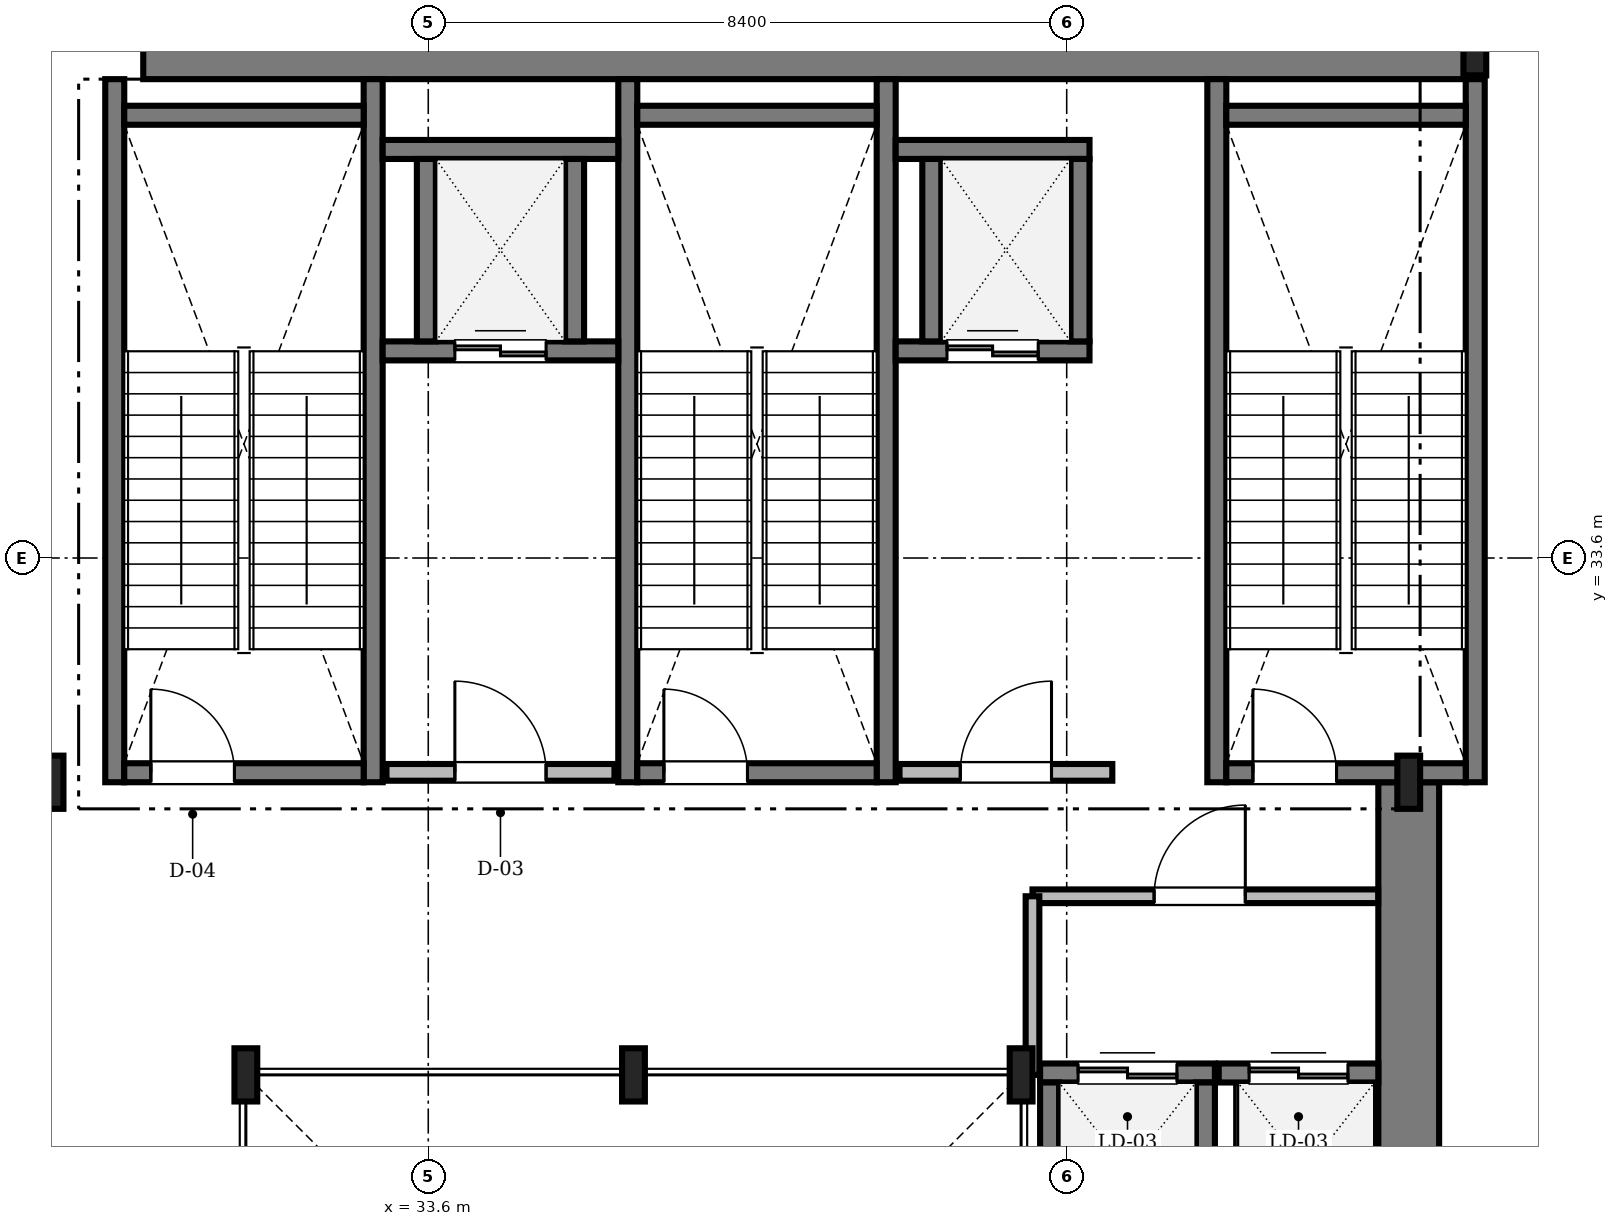
"""IFC4 building model, lengths in metres.
Left out: names, types, materials, properties, quantities, classifications, styles, units other than length and angle.
Written with IfcOpenShell. Run it as: python <this file> out.ifc"""

import sys

from ifc_helpers import new_model, si_unit, direction, frame, frame_2d, origin, origin_2d, place, context, subcontext, project, spatial, rectangle, i_section, extrude, source, transform, mapped, element, fill, save


model = new_model("IFC4")
c1 = context("Model", 3, precision=1e-05, world=origin(), true_north=direction((0.0, 1.0)))
c2 = subcontext(c1, "Body", "Model", "MODEL_VIEW")
j1 = project(units=[si_unit("LENGTHUNIT", "METRE"), si_unit("PLANEANGLEUNIT", "RADIAN")], contexts=[c1])
p1 = place(None, origin())
s1 = spatial("IfcSite", under=j1, at=p1, CompositionType="ELEMENT")
p2 = place(p1, origin())
s2 = spatial("IfcBuilding", under=s1, at=p2, CompositionType="ELEMENT")
p3 = place(p2, frame((0.0, 0.0, 237.3)))
s3 = spatial("IfcBuildingStorey", under=s2, at=p3, CompositionType="ELEMENT", Elevation=237.3)
m1 = source(origin(), c2, "Body", "SweptSolid", [
    extrude(rectangle(XDim=17.52, YDim=0.8, at=frame_2d((8.76, 0.0))), origin(), (0.0, 0.0, 1.0), 4.75),
])
p4 = place(p3, frame((29.85, 40.3, 0.0), z_axis=(0.0, 0.0, 1.0), x_axis=(1.0, 0.0, 0.0)))
e1 = element("IfcWall", 1, at=p4, inside=s3, PredefinedType="SHEAR", context=c2, shape_type="MappedRepresentation", body=[
    mapped(m1, transform((0.0, 0.0, 0.0), scale=1.0)),
])
m2 = source(origin(), c2, "Body", "SweptSolid", [
    extrude(rectangle(XDim=13.15, YDim=0.8, at=frame_2d((6.575, 0.0))), origin(), (0.0, 0.0, 1.0), 4.75),
])
p5 = place(p3, frame((46.5, 17.5, 0.0), z_axis=(0.0, 0.0, 1.0), x_axis=(0.0, 1.0, 0.0)))
e2 = element("IfcWall", 2, at=p5, inside=s3, PredefinedType="SHEAR", context=c2, shape_type="MappedRepresentation", body=[
    mapped(m2, transform((0.0, 0.0, 0.0), scale=1.0)),
])
m3 = source(origin(), c2, "Body", "SweptSolid", [
    extrude(i_section(OverallWidth=0.3, OverallDepth=0.7, WebThickness=0.017, FlangeThickness=0.032, FilletRadius=0.027, at=origin_2d()), origin(), (0.0, 0.0, 1.0), 4.75),
])
for number, where, z_axis, x_axis in (
    (3, (41.4, 26.8, 0.0), (0.0, 0.0, 1.0), (1.0, 0.0, 0.0)),
    (4, (36.3, 26.8, 0.0), (0.0, 0.0, 1.0), (1.0, 0.0, 0.0)),
    (5, (31.2, 26.8, 0.0), (0.0, 0.0, 1.0), (1.0, 0.0, 0.0)),
    (6, (28.65, 30.65, 0.0), (0.0, 0.0, 1.0), (1.0, 0.0, 0.0)),
    (7, (46.5, 30.65, 0.0), (0.0, 0.0, 1.0), (1.0, 0.0, 0.0)),
    (8, (47.37, 40.3, 0.0), (0.0, 0.0, 1.0), (1.0, 0.0, 0.0)),
):
    element("IfcColumn", number, at=place(p3, frame(where, z_axis=z_axis, x_axis=x_axis)), inside=s3, PredefinedType="COLUMN", context=c2, shape_type="MappedRepresentation", body=[
        mapped(m3, transform((0.0, 0.0, 0.0), scale=1.0)),
    ])
m4 = source(origin(), c2, "Body", "SweptSolid", [
    extrude(rectangle(XDim=9.25, YDim=0.25, at=frame_2d((4.625, 0.0))), origin(), (0.0, 0.0, 1.0), 5.2),
])
for number, where, z_axis, x_axis in (
    (9, (29.475, 30.65, 0.0), (0.0, 0.0, 1.0), (0.0, 1.0, 0.0)),
    (10, (32.875, 30.65, 0.0), (0.0, 0.0, 1.0), (0.0, 1.0, 0.0)),
):
    element("IfcWall", number, at=place(p3, frame(where, z_axis=z_axis, x_axis=x_axis)), inside=s3, PredefinedType="SOLIDWALL", context=c2, shape_type="MappedRepresentation", body=[
        mapped(m4, transform((0.0, 0.0, 0.0), scale=1.0)),
    ])
m5 = source(origin(), c2, "Body", "SweptSolid", [
    extrude(rectangle(XDim=3.15, YDim=0.25, at=frame_2d((1.575, 0.0))), origin(), (0.0, 0.0, 1.0), 5.2),
])
p6 = place(p3, frame((29.6, 39.425, 0.0), z_axis=(0.0, 0.0, 1.0), x_axis=(1.0, 0.0, 0.0)))
e11 = element("IfcWall", 11, at=p6, inside=s3, PredefinedType="SOLIDWALL", context=c2, shape_type="MappedRepresentation", body=[
    mapped(m5, transform((0.0, 0.0, 0.0), scale=1.0)),
])
p7 = place(p3, frame((29.6, 30.775, 0.0), z_axis=(0.0, 0.0, 1.0), x_axis=(1.0, 0.0, 0.0)))
e12 = element("IfcWall", 12, at=p7, inside=s3, PredefinedType="SOLIDWALL", context=c2, shape_type="MappedRepresentation", body=[
    mapped(m5, transform((0.0, 0.0, 0.0), scale=1.0)),
])
m6 = source(origin(), c2, "Body", "SweptSolid", [
    extrude(rectangle(XDim=1.1, YDim=2.2, at=frame_2d((0.55, 1.1))), frame((0.0, 0.135, 0.0), z_axis=(0.0, -1.0, 0.0), x_axis=(1.0, 0.0, 0.0)), (0.0, 0.0, 1.0), 0.27),
])
p8 = place(p7, frame((0.35, 0.0, 0.0)))
e13 = element("IfcOpeningElement", 13, at=p8, cuts=e12, PredefinedType="OPENING", context=c2, shape_type="MappedRepresentation", body=[
    mapped(m6, transform((0.0, 0.0, 0.0), scale=1.0)),
])
for number, where, z_axis, x_axis in (
    (14, (36.225, 30.65, 0.0), (0.0, 0.0, 1.0), (0.0, 1.0, 0.0)),
    (15, (39.625, 30.65, 0.0), (0.0, 0.0, 1.0), (0.0, 1.0, 0.0)),
):
    element("IfcWall", number, at=place(p3, frame(where, z_axis=z_axis, x_axis=x_axis)), inside=s3, PredefinedType="SOLIDWALL", context=c2, shape_type="MappedRepresentation", body=[
        mapped(m4, transform((0.0, 0.0, 0.0), scale=1.0)),
    ])
p9 = place(p3, frame((36.35, 39.425, 0.0), z_axis=(0.0, 0.0, 1.0), x_axis=(1.0, 0.0, 0.0)))
e16 = element("IfcWall", 16, at=p9, inside=s3, PredefinedType="SOLIDWALL", context=c2, shape_type="MappedRepresentation", body=[
    mapped(m5, transform((0.0, 0.0, 0.0), scale=1.0)),
])
p10 = place(p3, frame((36.35, 30.775, 0.0), z_axis=(0.0, 0.0, 1.0), x_axis=(1.0, 0.0, 0.0)))
e17 = element("IfcWall", 17, at=p10, inside=s3, PredefinedType="SOLIDWALL", context=c2, shape_type="MappedRepresentation", body=[
    mapped(m5, transform((0.0, 0.0, 0.0), scale=1.0)),
])
p11 = place(p10, frame((0.35, 0.0, 0.0)))
e18 = element("IfcOpeningElement", 18, at=p11, cuts=e17, PredefinedType="OPENING", context=c2, shape_type="MappedRepresentation", body=[
    mapped(m6, transform((0.0, 0.0, 0.0), scale=1.0)),
])
for number, where, z_axis, x_axis in (
    (19, (43.975, 30.65, 0.0), (0.0, 0.0, 1.0), (0.0, 1.0, 0.0)),
    (20, (47.375, 30.65, 0.0), (0.0, 0.0, 1.0), (0.0, 1.0, 0.0)),
):
    element("IfcWall", number, at=place(p3, frame(where, z_axis=z_axis, x_axis=x_axis)), inside=s3, PredefinedType="SOLIDWALL", context=c2, shape_type="MappedRepresentation", body=[
        mapped(m4, transform((0.0, 0.0, 0.0), scale=1.0)),
    ])
p12 = place(p3, frame((44.1, 39.425, 0.0), z_axis=(0.0, 0.0, 1.0), x_axis=(1.0, 0.0, 0.0)))
e21 = element("IfcWall", 21, at=p12, inside=s3, PredefinedType="SOLIDWALL", context=c2, shape_type="MappedRepresentation", body=[
    mapped(m5, transform((0.0, 0.0, 0.0), scale=1.0)),
])
p13 = place(p3, frame((44.1, 30.775, 0.0), z_axis=(0.0, 0.0, 1.0), x_axis=(1.0, 0.0, 0.0)))
e22 = element("IfcWall", 22, at=p13, inside=s3, PredefinedType="SOLIDWALL", context=c2, shape_type="MappedRepresentation", body=[
    mapped(m5, transform((0.0, 0.0, 0.0), scale=1.0)),
])
p14 = place(p13, frame((0.35, 0.0, 0.0)))
e23 = element("IfcOpeningElement", 23, at=p14, cuts=e22, PredefinedType="OPENING", context=c2, shape_type="MappedRepresentation", body=[
    mapped(m6, transform((0.0, 0.0, 0.0), scale=1.0)),
])
m7 = source(origin(), c2, "Body", "SweptSolid", [
    extrude(rectangle(XDim=3.0, YDim=0.22, at=frame_2d((1.5, 0.0))), origin(), (0.0, 0.0, 1.0), 4.75),
])
p15 = place(p3, frame((33.05, 30.78, 0.0), z_axis=(0.0, 0.0, 1.0), x_axis=(1.0, 0.0, 0.0)))
e24 = element("IfcWall", 24, at=p15, inside=s3, PredefinedType="SOLIDWALL", context=c2, shape_type="MappedRepresentation", body=[
    mapped(m7, transform((0.0, 0.0, 0.0), scale=1.0)),
])
m8 = source(origin(), c2, "Body", "SweptSolid", [
    extrude(rectangle(XDim=1.2, YDim=2.2, at=frame_2d((0.6, 1.1))), frame((0.0, 0.12, 0.0), z_axis=(0.0, -1.0, 0.0), x_axis=(1.0, 0.0, 0.0)), (0.0, 0.0, 1.0), 0.24),
])
p16 = place(p15, frame((0.9, 0.0, 0.0)))
e25 = element("IfcOpeningElement", 25, at=p16, cuts=e24, PredefinedType="OPENING", context=c2, shape_type="MappedRepresentation", body=[
    mapped(m8, transform((0.0, 0.0, 0.0), scale=1.0)),
])
m9 = source(origin(), c2, "Body", "SweptSolid", [
    extrude(rectangle(XDim=2.8, YDim=0.22, at=frame_2d((1.4, 0.0))), origin(), (0.0, 0.0, 1.0), 4.75),
])
p17 = place(p3, frame((39.8, 30.78, 0.0), z_axis=(0.0, 0.0, 1.0), x_axis=(1.0, 0.0, 0.0)))
e26 = element("IfcWall", 26, at=p17, inside=s3, PredefinedType="SOLIDWALL", context=c2, shape_type="MappedRepresentation", body=[
    mapped(m9, transform((0.0, 0.0, 0.0), scale=1.0)),
])
p18 = place(p17, frame((0.8, 0.0, 0.0)))
e27 = element("IfcOpeningElement", 27, at=p18, cuts=e26, PredefinedType="OPENING", context=c2, shape_type="MappedRepresentation", body=[
    mapped(m8, transform((0.0, 0.0, 0.0), scale=1.0)),
])
m10 = source(origin(), c2, "Body", "SweptSolid", [
    extrude(rectangle(XDim=3.1, YDim=0.25, at=frame_2d((1.55, 0.0))), origin(), (0.0, 0.0, 1.0), 4.75),
])
p19 = place(p3, frame((33.0, 36.325, 0.0), z_axis=(0.0, 0.0, 1.0), x_axis=(1.0, 0.0, 0.0)))
e28 = element("IfcWall", 28, at=p19, inside=s3, PredefinedType="SOLIDWALL", context=c2, shape_type="MappedRepresentation", body=[
    mapped(m10, transform((0.0, 0.0, 0.0), scale=1.0)),
])
m11 = source(origin(), c2, "Body", "SweptSolid", [
    extrude(rectangle(XDim=1.2, YDim=2.25, at=frame_2d((0.6, 1.125))), frame((0.0, 0.135, 0.0), z_axis=(0.0, -1.0, 0.0), x_axis=(1.0, 0.0, 0.0)), (0.0, 0.0, 1.0), 0.27),
])
p20 = place(p19, frame((0.95, 0.0, 0.0)))
e29 = element("IfcOpeningElement", 29, at=p20, cuts=e28, PredefinedType="OPENING", context=c2, shape_type="MappedRepresentation", body=[
    mapped(m11, transform((0.0, 0.0, 0.0), scale=1.0)),
])
p21 = place(p3, frame((33.0, 38.975, 0.0), z_axis=(0.0, 0.0, 1.0), x_axis=(1.0, 0.0, 0.0)))
e30 = element("IfcWall", 30, at=p21, inside=s3, PredefinedType="SOLIDWALL", context=c2, shape_type="MappedRepresentation", body=[
    mapped(m10, transform((0.0, 0.0, 0.0), scale=1.0)),
])
m12 = source(origin(), c2, "Body", "SweptSolid", [
    extrude(rectangle(XDim=2.4, YDim=0.25, at=frame_2d((1.2, 0.0))), origin(), (0.0, 0.0, 1.0), 4.75),
])
for number, where, z_axis, x_axis in (
    (31, (33.575, 36.45, 0.0), (0.0, 0.0, 1.0), (0.0, 1.0, 0.0)),
    (32, (35.525, 36.45, 0.0), (0.0, 0.0, 1.0), (0.0, 1.0, 0.0)),
):
    element("IfcWall", number, at=place(p3, frame(where, z_axis=z_axis, x_axis=x_axis)), inside=s3, PredefinedType="SOLIDWALL", context=c2, shape_type="MappedRepresentation", body=[
        mapped(m12, transform((0.0, 0.0, 0.0), scale=1.0)),
    ])
m13 = source(origin(), c2, "Body", "SweptSolid", [
    extrude(rectangle(XDim=2.55, YDim=0.25, at=frame_2d((1.275, 0.0))), origin(), (0.0, 0.0, 1.0), 4.75),
])
p22 = place(p3, frame((39.75, 36.325, 0.0), z_axis=(0.0, 0.0, 1.0), x_axis=(1.0, 0.0, 0.0)))
e33 = element("IfcWall", 33, at=p22, inside=s3, PredefinedType="SOLIDWALL", context=c2, shape_type="MappedRepresentation", body=[
    mapped(m13, transform((0.0, 0.0, 0.0), scale=1.0)),
])
p23 = place(p22, frame((0.675, 0.0, 0.0)))
e34 = element("IfcOpeningElement", 34, at=p23, cuts=e33, PredefinedType="OPENING", context=c2, shape_type="MappedRepresentation", body=[
    mapped(m11, transform((0.0, 0.0, 0.0), scale=1.0)),
])
p24 = place(p3, frame((39.75, 38.975, 0.0), z_axis=(0.0, 0.0, 1.0), x_axis=(1.0, 0.0, 0.0)))
e35 = element("IfcWall", 35, at=p24, inside=s3, PredefinedType="SOLIDWALL", context=c2, shape_type="MappedRepresentation", body=[
    mapped(m13, transform((0.0, 0.0, 0.0), scale=1.0)),
])
for number, where, z_axis, x_axis in (
    (36, (40.225, 36.45, 0.0), (0.0, 0.0, 1.0), (0.0, 1.0, 0.0)),
    (37, (42.175, 36.45, 0.0), (0.0, 0.0, 1.0), (0.0, 1.0, 0.0)),
):
    element("IfcWall", number, at=place(p3, frame(where, z_axis=z_axis, x_axis=x_axis)), inside=s3, PredefinedType="SOLIDWALL", context=c2, shape_type="MappedRepresentation", body=[
        mapped(m12, transform((0.0, 0.0, 0.0), scale=1.0)),
    ])
m14 = source(origin(), c2, "Body", "SweptSolid", [
    extrude(rectangle(XDim=2.3, YDim=0.25, at=frame_2d((1.15, 0.0))), origin(), (0.0, 0.0, 1.0), 4.75),
])
p25 = place(p3, frame((41.65, 26.825, 0.0), z_axis=(0.0, 0.0, 1.0), x_axis=(1.0, 0.0, 0.0)))
e38 = element("IfcWall", 38, at=p25, inside=s3, PredefinedType="SOLIDWALL", context=c2, shape_type="MappedRepresentation", body=[
    mapped(m14, transform((0.0, 0.0, 0.0), scale=1.0)),
])
m15 = source(origin(), c2, "Body", "SweptSolid", [
    extrude(rectangle(XDim=1.3, YDim=2.3, at=frame_2d((0.65, 1.15))), frame((0.0, 0.135, 0.0), z_axis=(0.0, -1.0, 0.0), x_axis=(1.0, 0.0, 0.0)), (0.0, 0.0, 1.0), 0.27),
])
p26 = place(p25, frame((0.5, 0.0, 0.0)))
e39 = element("IfcOpeningElement", 39, at=p26, cuts=e38, PredefinedType="OPENING", context=c2, shape_type="MappedRepresentation", body=[
    mapped(m15, transform((0.0, 0.0, 0.0), scale=1.0)),
])
for number, where, z_axis, x_axis in (
    (40, (41.775, 24.4, 0.0), (0.0, 0.0, 1.0), (0.0, 1.0, 0.0)),
    (41, (43.825, 24.4, 0.0), (0.0, 0.0, 1.0), (0.0, 1.0, 0.0)),
):
    element("IfcWall", number, at=place(p3, frame(where, z_axis=z_axis, x_axis=x_axis)), inside=s3, PredefinedType="SOLIDWALL", context=c2, shape_type="MappedRepresentation", body=[
        mapped(m14, transform((0.0, 0.0, 0.0), scale=1.0)),
    ])
m16 = source(origin(), c2, "Body", "SweptSolid", [
    extrude(rectangle(XDim=2.1, YDim=0.25, at=frame_2d((1.05, 0.0))), origin(), (0.0, 0.0, 1.0), 4.75),
])
p27 = place(p3, frame((44.0, 26.825, 0.0), z_axis=(0.0, 0.0, 1.0), x_axis=(1.0, 0.0, 0.0)))
e42 = element("IfcWall", 42, at=p27, inside=s3, PredefinedType="SOLIDWALL", context=c2, shape_type="MappedRepresentation", body=[
    mapped(m16, transform((0.0, 0.0, 0.0), scale=1.0)),
])
p28 = place(p27, frame((0.4, 0.0, 0.0)))
e43 = element("IfcOpeningElement", 43, at=p28, cuts=e42, PredefinedType="OPENING", context=c2, shape_type="MappedRepresentation", body=[
    mapped(m15, transform((0.0, 0.0, 0.0), scale=1.0)),
])
m17 = source(origin(), c2, "Body", "SweptSolid", [
    extrude(rectangle(XDim=4.548, YDim=0.18, at=frame_2d((2.274, 0.0))), origin(), (0.0, 0.0, 1.0), 4.382),
])
p29 = place(p3, frame((41.55, 29.15, 0.0), z_axis=(0.0, 0.0, 1.0), x_axis=(1.0, 0.0, 0.0)))
e44 = element("IfcWall", 44, at=p29, inside=s3, PredefinedType="PARTITIONING", context=c2, shape_type="MappedRepresentation", body=[
    mapped(m17, transform((0.0, 0.0, 0.0), scale=1.0)),
])
m18 = source(origin(), c2, "Body", "SweptSolid", [
    extrude(rectangle(XDim=1.2, YDim=2.2, at=frame_2d((0.6, 1.1))), frame((0.0, 0.1, 0.0), z_axis=(0.0, -1.0, 0.0), x_axis=(1.0, 0.0, 0.0)), (0.0, 0.0, 1.0), 0.2),
])
p30 = place(p29, frame((1.6, 0.0, 0.0)))
e45 = element("IfcOpeningElement", 45, at=p30, cuts=e44, PredefinedType="OPENING", context=c2, shape_type="MappedRepresentation", body=[
    mapped(m18, transform((0.0, 0.0, 0.0), scale=1.0)),
])
m19 = source(origin(), c2, "Body", "SweptSolid", [
    extrude(rectangle(XDim=2.35, YDim=0.18, at=frame_2d((1.175, 0.0))), origin(), (0.0, 0.0, 1.0), 4.382),
])
p31 = place(p3, frame((41.55, 26.8, 0.0), z_axis=(0.0, 0.0, 1.0), x_axis=(0.0, 1.0, 0.0)))
e46 = element("IfcWall", 46, at=p31, inside=s3, PredefinedType="PARTITIONING", context=c2, shape_type="MappedRepresentation", body=[
    mapped(m19, transform((0.0, 0.0, 0.0), scale=1.0)),
])
m20 = source(origin(), c2, "Body", "SweptSolid", [
    extrude(rectangle(XDim=1.1, YDim=2.2, at=frame_2d((0.55, 1.1))), frame((0.0, 0.025, 0.0), z_axis=(0.0, -1.0, 0.0), x_axis=(1.0, 0.0, 0.0)), (0.0, 0.0, 1.0), 0.05),
])
p32 = place(p8, origin())
e47 = element("IfcDoor", 47, at=p32, inside=s3, OperationType="SINGLE_SWING_LEFT", PredefinedType="DOOR", context=c2, shape_type="MappedRepresentation", body=[
    mapped(m20, transform((0.0, 0.0, 0.0), scale=1.0)),
])
fill(e13, e47)
p33 = place(p11, origin())
e48 = element("IfcDoor", 48, at=p33, inside=s3, OperationType="SINGLE_SWING_LEFT", PredefinedType="DOOR", context=c2, shape_type="MappedRepresentation", body=[
    mapped(m20, transform((0.0, 0.0, 0.0), scale=1.0)),
])
fill(e18, e48)
p34 = place(p14, origin())
e49 = element("IfcDoor", 49, at=p34, inside=s3, OperationType="SINGLE_SWING_LEFT", PredefinedType="DOOR", context=c2, shape_type="MappedRepresentation", body=[
    mapped(m20, transform((0.0, 0.0, 0.0), scale=1.0)),
])
fill(e23, e49)
m21 = source(origin(), c2, "Body", "SweptSolid", [
    extrude(rectangle(XDim=1.2, YDim=2.2, at=frame_2d((0.6, 1.1))), frame((0.0, 0.025, 0.0), z_axis=(0.0, -1.0, 0.0), x_axis=(1.0, 0.0, 0.0)), (0.0, 0.0, 1.0), 0.05),
])
p35 = place(p16, origin())
e50 = element("IfcDoor", 50, at=p35, inside=s3, OperationType="SINGLE_SWING_LEFT", PredefinedType="DOOR", context=c2, shape_type="MappedRepresentation", body=[
    mapped(m21, transform((0.0, 0.0, 0.0), scale=1.0)),
])
fill(e25, e50)
p36 = place(p18, origin())
e51 = element("IfcDoor", 51, at=p36, inside=s3, OperationType="SINGLE_SWING_RIGHT", PredefinedType="DOOR", context=c2, shape_type="MappedRepresentation", body=[
    mapped(m21, transform((0.0, 0.0, 0.0), scale=1.0)),
])
fill(e27, e51)
m22 = source(origin(), c2, "Body", "SweptSolid", [
    extrude(rectangle(XDim=1.2, YDim=2.25, at=frame_2d((0.6, 1.125))), frame((0.0, 0.025, 0.0), z_axis=(0.0, -1.0, 0.0), x_axis=(1.0, 0.0, 0.0)), (0.0, 0.0, 1.0), 0.05),
])
p37 = place(p20, origin())
e52 = element("IfcDoor", 52, at=p37, inside=s3, OperationType="DOUBLE_DOOR_SLIDING", PredefinedType="DOOR", context=c2, shape_type="MappedRepresentation", body=[
    mapped(m22, transform((0.0, 0.0, 0.0), scale=1.0)),
])
fill(e29, e52)
p38 = place(p23, origin())
e53 = element("IfcDoor", 53, at=p38, inside=s3, OperationType="DOUBLE_DOOR_SLIDING", PredefinedType="DOOR", context=c2, shape_type="MappedRepresentation", body=[
    mapped(m22, transform((0.0, 0.0, 0.0), scale=1.0)),
])
fill(e34, e53)
m23 = source(origin(), c2, "Body", "SweptSolid", [
    extrude(rectangle(XDim=1.3, YDim=2.3, at=frame_2d((0.65, 1.15))), frame((0.0, 0.025, 0.0), z_axis=(0.0, -1.0, 0.0), x_axis=(1.0, 0.0, 0.0)), (0.0, 0.0, 1.0), 0.05),
])
p39 = place(p26, origin())
e54 = element("IfcDoor", 54, at=p39, inside=s3, OperationType="DOUBLE_DOOR_SLIDING", PredefinedType="DOOR", context=c2, shape_type="MappedRepresentation", body=[
    mapped(m23, transform((0.0, 0.0, 0.0), scale=1.0)),
])
fill(e39, e54)
p40 = place(p28, origin())
e55 = element("IfcDoor", 55, at=p40, inside=s3, OperationType="DOUBLE_DOOR_SLIDING", PredefinedType="DOOR", context=c2, shape_type="MappedRepresentation", body=[
    mapped(m23, transform((0.0, 0.0, 0.0), scale=1.0)),
])
fill(e43, e55)
p41 = place(p30, origin())
e56 = element("IfcDoor", 56, at=p41, inside=s3, OperationType="SINGLE_SWING_RIGHT", PredefinedType="DOOR", context=c2, shape_type="MappedRepresentation", body=[
    mapped(m21, transform((0.0, 0.0, 0.0), scale=1.0)),
])
fill(e45, e56)
save(model, sys.argv[1])
